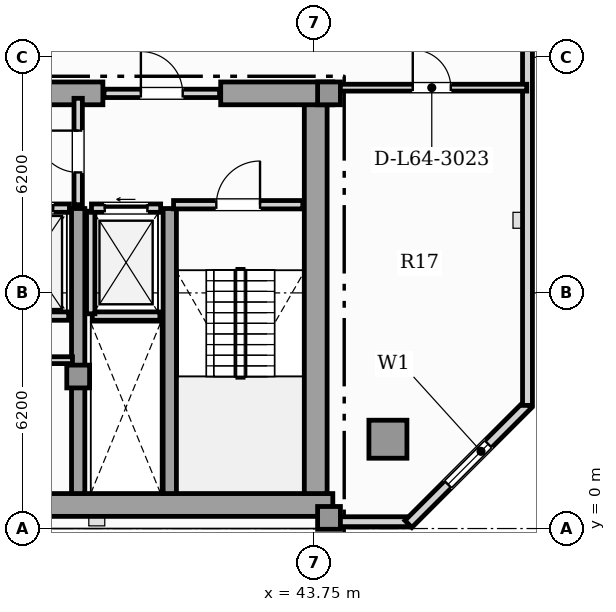
"""IFC4 building model, lengths in metres.
Left out: names, types, materials, properties, quantities, classifications, styles, units other than length and angle.
Written with IfcOpenShell. Run it as: python <this file> out.ifc"""

import sys

from ifc_helpers import new_model, si_unit, direction, frame, frame_2d, origin, origin_2d, place, context, subcontext, project, spatial, rectangle, hollow_rectangle, extrude, element, fill, save


model = new_model("IFC4")
c1 = context("Model", 3, precision=1e-05, world=origin(), true_north=direction((0.0, 1.0)))
c2 = subcontext(c1, "Body", "Model", "MODEL_VIEW")
j1 = project(units=[si_unit("LENGTHUNIT", "METRE"), si_unit("PLANEANGLEUNIT", "RADIAN")], contexts=[c1])
p1 = place(None, origin())
s1 = spatial("IfcSite", under=j1, at=p1, CompositionType="ELEMENT")
p2 = place(p1, origin())
s2 = spatial("IfcBuilding", under=s1, at=p2, CompositionType="ELEMENT")
p3 = place(p2, frame((0.0, 0.0, 260.6)))
s3 = spatial("IfcBuildingStorey", under=s2, at=p3, CompositionType="ELEMENT", Elevation=260.6)
p4 = place(p3, frame((13.25, 0.62, 0.0), z_axis=(0.0, 0.0, 1.0), x_axis=(1.0, 0.0, 0.0)))
e1 = element("IfcWall", 1, at=p4, inside=s3, PredefinedType="SHEAR", context=c2, shape_type="SweptSolid", body=[
    extrude(rectangle(XDim=31.0, YDim=0.6, at=frame_2d((15.5, 0.0))), origin(), (0.0, 0.0, 1.0), 3.65),
])
p5 = place(p3, frame((43.8, 0.92, 0.0), z_axis=(0.0, 0.0, 1.0), x_axis=(0.0, 1.0, 0.0)))
e2 = element("IfcWall", 2, at=p5, inside=s3, PredefinedType="SHEAR", context=c2, shape_type="SweptSolid", body=[
    extrude(rectangle(XDim=10.53, YDim=0.6, at=frame_2d((5.265, 0.0))), origin(), (0.0, 0.0, 1.0), 3.65),
])
p6 = place(p3, frame((30.9, 11.45, 0.0), z_axis=(0.0, 0.0, 1.0), x_axis=(1.0, 0.0, 0.0)))
e3 = element("IfcWall", 3, at=p6, inside=s3, PredefinedType="SHEAR", context=c2, shape_type="SweptSolid", body=[
    extrude(rectangle(XDim=7.3, YDim=0.6, at=frame_2d((3.65, 0.0))), origin(), (0.0, 0.0, 1.0), 3.65),
])
p7 = place(p3, frame((41.3, 11.45, 0.0), z_axis=(0.0, 0.0, 1.0), x_axis=(1.0, 0.0, 0.0)))
e4 = element("IfcWall", 4, at=p7, inside=s3, PredefinedType="SHEAR", context=c2, shape_type="SweptSolid", body=[
    extrude(rectangle(XDim=2.95, YDim=0.6, at=frame_2d((1.475, 0.0))), origin(), (0.0, 0.0, 1.0), 3.65),
])
for number, where, z_axis, x_axis in (
    (5, (37.55, 0.92, 0.0), (0.0, 0.0, 1.0), (0.0, 1.0, 0.0)),
    (6, (39.96, 0.92, 0.0), (0.0, 0.0, 1.0), (0.0, 1.0, 0.0)),
):
    element("IfcWall", number, at=place(p3, frame(where, z_axis=z_axis, x_axis=x_axis)), inside=s3, PredefinedType="SHEAR", context=c2, shape_type="SweptSolid", body=[
        extrude(rectangle(XDim=7.5, YDim=0.35, at=frame_2d((3.75, 0.0))), origin(), (0.0, 0.0, 1.0), 3.65),
    ])
for number, where, z_axis, x_axis in (
    (7, (44.15, 0.28, 0.0), (0.0, 0.0, 1.0), (1.0, 0.0, 0.0)),
    (8, (44.15, 11.45, 0.0), (0.0, 0.0, 1.0), (1.0, 0.0, 0.0)),
    (9, (37.55, 4.0, 0.0), (0.0, 0.0, 1.0), (1.0, 0.0, 0.0)),
):
    element("IfcColumn", number, at=place(p3, frame(where, z_axis=z_axis, x_axis=x_axis)), inside=s3, PredefinedType="COLUMN", context=c2, shape_type="SweptSolid", body=[
        extrude(rectangle(XDim=0.6, YDim=0.6, at=origin_2d()), origin(), (0.0, 0.0, 1.0), 3.85),
    ])
p8 = place(p3, frame((45.7, 2.35, 0.0), z_axis=(0.0, 0.0, 1.0), x_axis=(1.0, 0.0, 0.0)))
e10 = element("IfcColumn", 10, at=p8, inside=s3, PredefinedType="USERDEFINED", context=c2, shape_type="SweptSolid", body=[
    extrude(hollow_rectangle(XDim=1.0, YDim=1.0, WallThickness=0.06, at=origin_2d()), origin(), (0.0, 0.0, 1.0), 3.85),
])
p9 = place(p3, frame((44.25, 0.18, 0.0), z_axis=(0.0, 0.0, 1.0), x_axis=(1.0, 0.0, 0.0)))
e11 = element("IfcWall", 11, at=p9, inside=s3, PredefinedType="SOLIDWALL", context=c2, shape_type="SweptSolid", body=[
    extrude(rectangle(XDim=2.012, YDim=0.26, at=frame_2d((1.006, 0.0))), origin(), (0.0, 0.0, 1.0), 3.65),
])
p10 = place(p3, frame((46.239, 0.12, 0.0), z_axis=(0.0, 0.0, 1.0), x_axis=(0.707079321262, 0.707134240044, 0.0)))
e12 = element("IfcWall", 12, at=p10, inside=s3, PredefinedType="SOLIDWALL", context=c2, shape_type="SweptSolid", body=[
    extrude(rectangle(XDim=4.446, YDim=0.26, at=frame_2d((2.223, 0.0))), origin(), (0.0, 0.0, 1.0), 3.65),
])
p11 = place(p10, frame((1.473, 0.0, 0.9)))
e13 = element("IfcOpeningElement", 13, at=p11, cuts=e12, PredefinedType="OPENING", context=c2, shape_type="SweptSolid", body=[
    extrude(rectangle(XDim=1.5, YDim=1.95, at=frame_2d((0.75, 0.975))), frame((0.0, 0.14, 0.0), z_axis=(0.0, -1.0, 0.0), x_axis=(1.0, 0.0, 0.0)), (0.0, 0.0, 1.0), 0.28),
])
p12 = place(p3, frame((49.372, 3.24, 0.0), z_axis=(0.0, 0.0, 1.0), x_axis=(0.0, 1.0, 0.0)))
e14 = element("IfcWall", 14, at=p12, inside=s3, PredefinedType="SOLIDWALL", context=c2, shape_type="SweptSolid", body=[
    extrude(rectangle(XDim=17.1, YDim=0.26, at=frame_2d((8.55, 0.0))), origin(), (0.0, 0.0, 1.0), 3.65),
])
p13 = place(p12, frame((11.055, 0.0, 0.95)))
e15 = element("IfcOpeningElement", 15, at=p13, cuts=e14, PredefinedType="OPENING", context=c2, shape_type="SweptSolid", body=[
    extrude(rectangle(XDim=0.9, YDim=1.5, at=frame_2d((0.45, 0.75))), frame((0.0, 0.14, 0.0), z_axis=(0.0, -1.0, 0.0), x_axis=(1.0, 0.0, 0.0)), (0.0, 0.0, 1.0), 0.28),
])
p14 = place(p12, frame((12.885, 0.0, 0.95)))
e16 = element("IfcOpeningElement", 16, at=p14, cuts=e14, PredefinedType="OPENING", context=c2, shape_type="SweptSolid", body=[
    extrude(rectangle(XDim=0.9, YDim=1.5, at=frame_2d((0.45, 0.75))), frame((0.0, 0.14, 0.0), z_axis=(0.0, -1.0, 0.0), x_axis=(1.0, 0.0, 0.0)), (0.0, 0.0, 1.0), 0.28),
])
p15 = place(p12, frame((14.56, 0.0, 0.95)))
e17 = element("IfcOpeningElement", 17, at=p15, cuts=e14, PredefinedType="OPENING", context=c2, shape_type="SweptSolid", body=[
    extrude(rectangle(XDim=0.9, YDim=1.5, at=frame_2d((0.45, 0.75))), frame((0.0, 0.14, 0.0), z_axis=(0.0, -1.0, 0.0), x_axis=(1.0, 0.0, 0.0)), (0.0, 0.0, 1.0), 0.28),
])
p16 = place(p3, frame((37.92, 5.59, 0.0), z_axis=(0.0, 0.0, 1.0), x_axis=(1.0, 0.0, 0.0)))
e18 = element("IfcWall", 18, at=p16, inside=s3, PredefinedType="SOLIDWALL", context=c2, shape_type="SweptSolid", body=[
    extrude(rectangle(XDim=1.78, YDim=0.22, at=frame_2d((0.89, 0.0))), origin(), (0.0, 0.0, 1.0), 3.65),
])
p17 = place(p3, frame((37.88, 5.65, 0.0), z_axis=(0.0, 0.0, 1.0), x_axis=(0.0, 1.0, 0.0)))
e19 = element("IfcWall", 19, at=p17, inside=s3, PredefinedType="SOLIDWALL", context=c2, shape_type="SweptSolid", body=[
    extrude(rectangle(XDim=2.7, YDim=0.22, at=frame_2d((1.35, 0.0))), origin(), (0.0, 0.0, 1.0), 3.65),
])
p18 = place(p3, frame((37.9, 8.43, 0.0), z_axis=(0.0, 0.0, 1.0), x_axis=(1.0, 0.0, 0.0)))
e20 = element("IfcWall", 20, at=p18, inside=s3, PredefinedType="SOLIDWALL", context=c2, shape_type="SweptSolid", body=[
    extrude(rectangle(XDim=1.82, YDim=0.22, at=frame_2d((0.91, 0.0))), origin(), (0.0, 0.0, 1.0), 3.65),
])
p19 = place(p18, frame((0.35, 0.0, 0.0)))
e21 = element("IfcOpeningElement", 21, at=p19, cuts=e20, PredefinedType="OPENING", context=c2, shape_type="SweptSolid", body=[
    extrude(rectangle(XDim=1.12, YDim=2.25, at=frame_2d((0.56, 1.125))), frame((0.0, 0.12, 0.0), z_axis=(0.0, -1.0, 0.0), x_axis=(1.0, 0.0, 0.0)), (0.0, 0.0, 1.0), 0.24),
])
p20 = place(p3, frame((35.3, 5.59, 0.0), z_axis=(0.0, 0.0, 1.0), x_axis=(1.0, 0.0, 0.0)))
e22 = element("IfcWall", 22, at=p20, inside=s3, PredefinedType="SOLIDWALL", context=c2, shape_type="SweptSolid", body=[
    extrude(rectangle(XDim=2.0, YDim=0.22, at=frame_2d((1.0, 0.0))), origin(), (0.0, 0.0, 1.0), 3.65),
])
p21 = place(p3, frame((35.28, 8.43, 0.0), z_axis=(0.0, 0.0, 1.0), x_axis=(1.0, 0.0, 0.0)))
e23 = element("IfcWall", 23, at=p21, inside=s3, PredefinedType="SOLIDWALL", context=c2, shape_type="SweptSolid", body=[
    extrude(rectangle(XDim=2.04, YDim=0.22, at=frame_2d((1.02, 0.0))), origin(), (0.0, 0.0, 1.0), 3.65),
])
p22 = place(p21, frame((0.43, 0.0, 0.0)))
e24 = element("IfcOpeningElement", 24, at=p22, cuts=e23, PredefinedType="OPENING", context=c2, shape_type="SweptSolid", body=[
    extrude(rectangle(XDim=1.18, YDim=2.2, at=frame_2d((0.59, 1.1))), frame((0.0, 0.12, 0.0), z_axis=(0.0, -1.0, 0.0), x_axis=(1.0, 0.0, 0.0)), (0.0, 0.0, 1.0), 0.24),
])
p23 = place(p3, frame((40.06, 8.52, 0.0), z_axis=(0.0, 0.0, 1.0), x_axis=(1.0, 0.0, 0.0)))
e25 = element("IfcWall", 25, at=p23, inside=s3, PredefinedType="SOLIDWALL", context=c2, shape_type="SweptSolid", body=[
    extrude(rectangle(XDim=3.4, YDim=0.22, at=frame_2d((1.7, 0.0))), origin(), (0.0, 0.0, 1.0), 3.65),
])
p24 = place(p23, frame((1.125, 0.0, 0.0)))
e26 = element("IfcOpeningElement", 26, at=p24, cuts=e25, PredefinedType="OPENING", context=c2, shape_type="SweptSolid", body=[
    extrude(rectangle(XDim=1.15, YDim=2.2, at=frame_2d((0.575, 1.1))), frame((0.0, 0.12, 0.0), z_axis=(0.0, -1.0, 0.0), x_axis=(1.0, 0.0, 0.0)), (0.0, 0.0, 1.0), 0.24),
])
p25 = place(p3, frame((37.55, 8.52, 0.0), z_axis=(0.0, 0.0, 1.0), x_axis=(0.0, 1.0, 0.0)))
e27 = element("IfcWall", 27, at=p25, inside=s3, PredefinedType="SOLIDWALL", context=c2, shape_type="SweptSolid", body=[
    extrude(rectangle(XDim=2.8, YDim=0.22, at=frame_2d((1.4, 0.0))), origin(), (0.0, 0.0, 1.0), 3.105),
])
p26 = place(p25, frame((0.85, 0.0, 0.0)))
e28 = element("IfcOpeningElement", 28, at=p26, cuts=e27, PredefinedType="OPENING", context=c2, shape_type="SweptSolid", body=[
    extrude(rectangle(XDim=1.1, YDim=2.2, at=frame_2d((0.55, 1.1))), frame((0.0, 0.12, 0.0), z_axis=(0.0, -1.0, 0.0), x_axis=(1.0, 0.0, 0.0)), (0.0, 0.0, 1.0), 0.24),
])
p27 = place(p3, frame((38.23, 11.45, 0.0), z_axis=(0.0, 0.0, 1.0), x_axis=(1.0, 0.0, 0.0)))
e29 = element("IfcWall", 29, at=p27, inside=s3, PredefinedType="SOLIDWALL", context=c2, shape_type="SweptSolid", body=[
    extrude(rectangle(XDim=3.04, YDim=0.22, at=frame_2d((1.52, 0.0))), origin(), (0.0, 0.0, 1.0), 3.65),
])
p28 = place(p27, frame((0.97, 0.0, 0.0)))
e30 = element("IfcOpeningElement", 30, at=p28, cuts=e29, PredefinedType="OPENING", context=c2, shape_type="SweptSolid", body=[
    extrude(rectangle(XDim=1.1, YDim=2.2, at=frame_2d((0.55, 1.1))), frame((0.0, 0.12, 0.0), z_axis=(0.0, -1.0, 0.0), x_axis=(1.0, 0.0, 0.0)), (0.0, 0.0, 1.0), 0.24),
])
p29 = place(p3, frame((32.22, 4.43, 0.0), z_axis=(0.0, 0.0, 1.0), x_axis=(1.0, 0.0, 0.0)))
e31 = element("IfcWall", 31, at=p29, inside=s3, PredefinedType="PARTITIONING", context=c2, shape_type="SweptSolid", body=[
    extrude(rectangle(XDim=5.18, YDim=0.18, at=frame_2d((2.59, 0.0))), origin(), (0.0, 0.0, 1.0), 3.65),
])
p30 = place(p3, frame((44.355, 11.6, 0.0), z_axis=(0.0, 0.0, 1.0), x_axis=(1.0, 0.0, 0.0)))
e32 = element("IfcWall", 32, at=p30, inside=s3, PredefinedType="PARTITIONING", context=c2, shape_type="SweptSolid", body=[
    extrude(rectangle(XDim=4.998, YDim=0.18, at=frame_2d((2.499, 0.0))), origin(), (0.0, 0.0, 1.0), 3.65),
])
p31 = place(p30, frame((1.999, 0.0, 0.0)))
e33 = element("IfcOpeningElement", 33, at=p31, cuts=e32, PredefinedType="OPENING", context=c2, shape_type="SweptSolid", body=[
    extrude(rectangle(XDim=1.0, YDim=2.15, at=frame_2d((0.5, 1.075))), frame((0.0, 0.1, 0.0), z_axis=(0.0, -1.0, 0.0), x_axis=(1.0, 0.0, 0.0)), (0.0, 0.0, 1.0), 0.2),
])
p32 = place(p11, origin())
e34 = element("IfcWindow", 34, at=p32, inside=s3, PartitioningType="SINGLE_PANEL", PredefinedType="WINDOW", context=c2, shape_type="SweptSolid", body=[
    extrude(rectangle(XDim=1.5, YDim=1.95, at=frame_2d((0.75, 0.975))), frame((0.0, 0.03, 0.0), z_axis=(0.0, -1.0, 0.0), x_axis=(1.0, 0.0, 0.0)), (0.0, 0.0, 1.0), 0.06),
])
fill(e13, e34)
p33 = place(p19, origin())
e35 = element("IfcDoor", 35, at=p33, inside=s3, OperationType="SLIDING_TO_LEFT", PredefinedType="DOOR", context=c2, shape_type="SweptSolid", body=[
    extrude(rectangle(XDim=1.12, YDim=2.25, at=frame_2d((0.56, 1.125))), frame((0.0, 0.025, 0.0), z_axis=(0.0, -1.0, 0.0), x_axis=(1.0, 0.0, 0.0)), (0.0, 0.0, 1.0), 0.05),
])
fill(e21, e35)
p34 = place(p22, origin())
e36 = element("IfcDoor", 36, at=p34, inside=s3, OperationType="SLIDING_TO_RIGHT", PredefinedType="DOOR", context=c2, shape_type="SweptSolid", body=[
    extrude(rectangle(XDim=1.18, YDim=2.2, at=frame_2d((0.59, 1.1))), frame((0.0, 0.025, 0.0), z_axis=(0.0, -1.0, 0.0), x_axis=(1.0, 0.0, 0.0)), (0.0, 0.0, 1.0), 0.05),
])
fill(e24, e36)
p35 = place(p24, origin())
e37 = element("IfcDoor", 37, at=p35, inside=s3, OperationType="SINGLE_SWING_RIGHT", PredefinedType="DOOR", context=c2, shape_type="SweptSolid", body=[
    extrude(rectangle(XDim=1.15, YDim=2.2, at=frame_2d((0.575, 1.1))), frame((0.0, 0.025, 0.0), z_axis=(0.0, -1.0, 0.0), x_axis=(1.0, 0.0, 0.0)), (0.0, 0.0, 1.0), 0.05),
])
fill(e26, e37)
p36 = place(p26, origin())
e38 = element("IfcDoor", 38, at=p36, inside=s3, OperationType="SINGLE_SWING_RIGHT", PredefinedType="DOOR", context=c2, shape_type="SweptSolid", body=[
    extrude(rectangle(XDim=1.1, YDim=2.2, at=frame_2d((0.55, 1.1))), frame((0.0, 0.025, 0.0), z_axis=(0.0, -1.0, 0.0), x_axis=(1.0, 0.0, 0.0)), (0.0, 0.0, 1.0), 0.05),
])
fill(e28, e38)
p37 = place(p28, origin())
e39 = element("IfcDoor", 39, at=p37, inside=s3, OperationType="SINGLE_SWING_LEFT", PredefinedType="DOOR", context=c2, shape_type="SweptSolid", body=[
    extrude(rectangle(XDim=1.1, YDim=2.2, at=frame_2d((0.55, 1.1))), frame((0.0, 0.025, 0.0), z_axis=(0.0, -1.0, 0.0), x_axis=(1.0, 0.0, 0.0)), (0.0, 0.0, 1.0), 0.05),
])
fill(e30, e39)
p38 = place(p31, origin())
e40 = element("IfcDoor", 40, at=p38, inside=s3, OperationType="SINGLE_SWING_LEFT", PredefinedType="DOOR", context=c2, shape_type="SweptSolid", body=[
    extrude(rectangle(XDim=1.0, YDim=2.15, at=frame_2d((0.5, 1.075))), frame((0.0, 0.025, 0.0), z_axis=(0.0, -1.0, 0.0), x_axis=(1.0, 0.0, 0.0)), (0.0, 0.0, 1.0), 0.05),
])
fill(e33, e40)
save(model, sys.argv[1])
